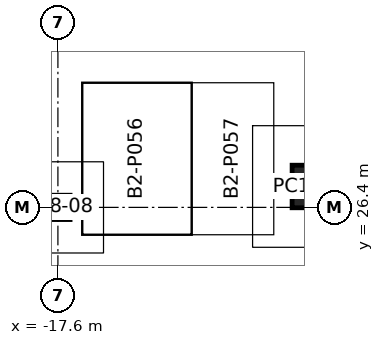
"""IFC4 building model, lengths in metres.
Left out: names, types, materials, properties, quantities, classifications, styles, units other than length and angle.
Written with IfcOpenShell. Run it as: python <this file> out.ifc"""

import sys

from ifc_helpers import new_model, si_unit, direction, frame, origin, origin_2d, place, context, subcontext, project, spatial, rectangle, extrude, element, save


model = new_model("IFC4")
c1 = context("Model", 3, precision=1e-05, world=origin(), true_north=direction((0.0, 1.0)))
c2 = subcontext(c1, "Body", "Model", "MODEL_VIEW")
j1 = project(units=[si_unit("LENGTHUNIT", "METRE"), si_unit("PLANEANGLEUNIT", "RADIAN")], contexts=[c1])
p1 = place(None, origin())
s1 = spatial("IfcSite", under=j1, at=p1, CompositionType="ELEMENT")
p2 = place(p1, origin())
s2 = spatial("IfcBuilding", under=s1, at=p2, CompositionType="ELEMENT")
p3 = place(p2, frame((0.0, 0.0, -9.0)))
s3 = spatial("IfcBuildingStorey", under=s2, at=p3, CompositionType="ELEMENT", Elevation=-9.0)
p4 = place(p3, frame((-9.197, 27.087, 0.0), z_axis=(0.0, 0.0, 1.0), x_axis=(0.609232107146, 0.792991954324, 0.0)))
e1 = element("IfcColumn", 1, at=p4, inside=s3, PredefinedType="COLUMN", context=c2, shape_type="SweptSolid", body=[
    extrude(rectangle(XDim=1.4, YDim=1.4, at=origin_2d()), origin(), (0.0, 0.0, 1.0), 4.5),
])
p5 = place(p3, frame((-17.6, 26.4, 0.0), z_axis=(0.0, 0.0, 1.0), x_axis=(1.0, 0.0, 0.0)))
e2 = element("IfcColumn", 2, at=p5, inside=s3, PredefinedType="COLUMN", context=c2, shape_type="SweptSolid", body=[
    extrude(rectangle(XDim=0.8, YDim=0.8, at=origin_2d()), origin(), (0.0, 0.0, 1.0), 4.5),
])
save(model, sys.argv[1])
